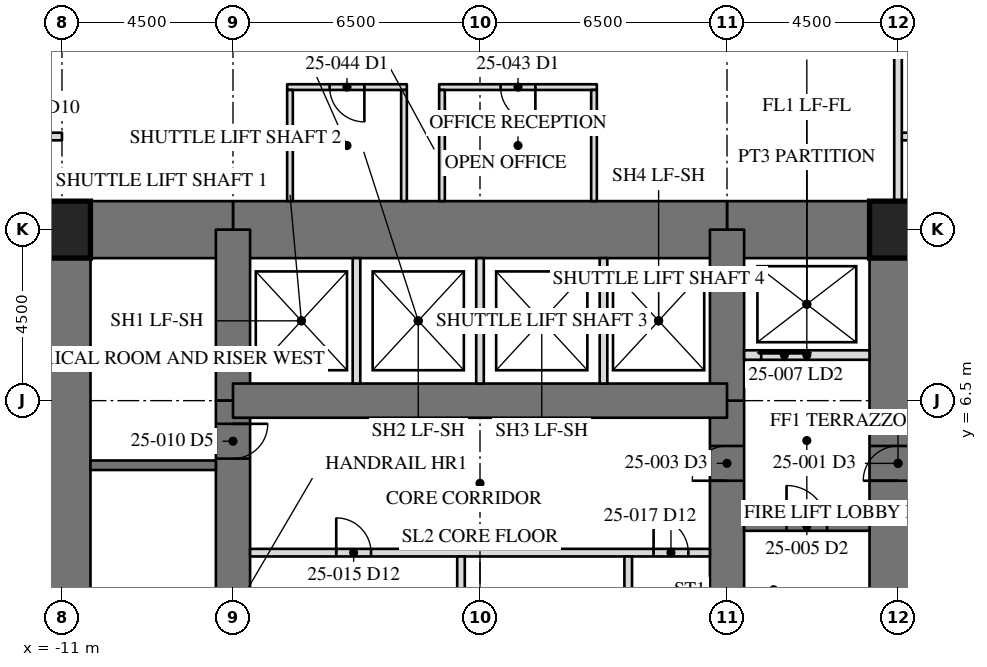
"""IFC4 building model, lengths in metres.
Left out: names, types, materials, properties, quantities, classifications, styles, units other than length and angle.
Written with IfcOpenShell. Run it as: python <this file> out.ifc"""

import sys

from ifc_helpers import new_model, si_unit, direction, frame, frame_2d, origin, origin_2d, place, context, subcontext, project, spatial, rectangle, hollow_rectangle, extrude, element, fill, save


model = new_model("IFC4")
c1 = context("Model", 3, precision=1e-05, world=origin(), true_north=direction((0.0, 1.0)))
c2 = subcontext(c1, "Body", "Model", "MODEL_VIEW")
j1 = project(units=[si_unit("LENGTHUNIT", "METRE"), si_unit("PLANEANGLEUNIT", "RADIAN")], contexts=[c1])
p1 = place(None, origin())
s1 = spatial("IfcSite", under=j1, at=p1, CompositionType="ELEMENT")
p2 = place(p1, origin())
s2 = spatial("IfcBuilding", under=s1, at=p2, CompositionType="ELEMENT")
p3 = place(p2, frame((0.0, 0.0, 109.0)))
s3 = spatial("IfcBuildingStorey", under=s2, at=p3, CompositionType="ELEMENT", Elevation=109.0)
p4 = place(p3, frame((11.0, -11.0, 0.0), z_axis=(0.0, 0.0, 1.0), x_axis=(0.0, 1.0, 0.0)))
e1 = element("IfcWall", 1, at=p4, inside=s3, PredefinedType="SHEAR", context=c2, shape_type="SweptSolid", body=[
    extrude(rectangle(XDim=22.0, YDim=1.5, at=frame_2d((11.0, 0.0))), origin(), (0.0, 0.0, 1.0), 4.1),
])
p5 = place(p4, frame((15.393, 0.0, 0.0)))
e2 = element("IfcOpeningElement", 2, at=p5, cuts=e1, PredefinedType="OPENING", context=c2, shape_type="SweptSolid", body=[
    extrude(rectangle(XDim=0.915, YDim=2.134, at=frame_2d((0.458, 1.067))), frame((0.0, 0.76, 0.0), z_axis=(0.0, -1.0, 0.0), x_axis=(1.0, 0.0, 0.0)), (0.0, 0.0, 1.0), 1.52),
])
p6 = place(p3, frame((-11.0, 11.0, 0.0), z_axis=(0.0, 0.0, 1.0), x_axis=(0.0, -1.0, 0.0)))
e3 = element("IfcWall", 3, at=p6, inside=s3, PredefinedType="SHEAR", context=c2, shape_type="SweptSolid", body=[
    extrude(rectangle(XDim=22.0, YDim=1.5, at=frame_2d((11.0, 0.0))), origin(), (0.0, 0.0, 1.0), 4.1),
])
p7 = place(p6, frame((15.393, 0.0, 0.0)))
e4 = element("IfcOpeningElement", 4, at=p7, cuts=e3, PredefinedType="OPENING", context=c2, shape_type="SweptSolid", body=[
    extrude(rectangle(XDim=0.915, YDim=2.134, at=frame_2d((0.458, 1.067))), frame((0.0, 0.76, 0.0), z_axis=(0.0, -1.0, 0.0), x_axis=(1.0, 0.0, 0.0)), (0.0, 0.0, 1.0), 1.52),
])
p8 = place(p3, frame((11.0, 11.0, 0.0), z_axis=(0.0, 0.0, 1.0), x_axis=(-1.0, 0.0, 0.0)))
e5 = element("IfcWall", 5, at=p8, inside=s3, PredefinedType="SHEAR", context=c2, shape_type="SweptSolid", body=[
    extrude(rectangle(XDim=4.5, YDim=1.5, at=frame_2d((2.25, 0.0))), origin(), (0.0, 0.0, 1.0), 4.1),
])
p9 = place(p3, frame((6.5, 11.0, 0.0), z_axis=(0.0, 0.0, 1.0), x_axis=(-1.0, 0.0, 0.0)))
e6 = element("IfcWall", 6, at=p9, inside=s3, PredefinedType="SHEAR", context=c2, shape_type="SweptSolid", body=[
    extrude(rectangle(XDim=13.0, YDim=1.5, at=frame_2d((6.5, 0.0))), origin(), (0.0, 0.0, 1.0), 4.1),
])
p10 = place(p3, frame((-6.5, 11.0, 0.0), z_axis=(0.0, 0.0, 1.0), x_axis=(-1.0, 0.0, 0.0)))
e7 = element("IfcWall", 7, at=p10, inside=s3, PredefinedType="SHEAR", context=c2, shape_type="SweptSolid", body=[
    extrude(rectangle(XDim=4.5, YDim=1.5, at=frame_2d((2.25, 0.0))), origin(), (0.0, 0.0, 1.0), 4.1),
])
p11 = place(p3, frame((6.5, -6.5, 0.0), z_axis=(0.0, 0.0, 1.0), x_axis=(0.0, 1.0, 0.0)))
e8 = element("IfcWall", 8, at=p11, inside=s3, PredefinedType="SHEAR", context=c2, shape_type="SweptSolid", body=[
    extrude(rectangle(XDim=13.0, YDim=0.9, at=frame_2d((6.5, 0.0))), origin(), (0.0, 0.0, 1.0), 4.1),
])
p12 = place(p11, frame((10.893, 0.0, 0.0)))
e9 = element("IfcOpeningElement", 9, at=p12, cuts=e8, PredefinedType="OPENING", context=c2, shape_type="SweptSolid", body=[
    extrude(rectangle(XDim=0.915, YDim=2.134, at=frame_2d((0.458, 1.067))), frame((0.0, 0.46, 0.0), z_axis=(0.0, -1.0, 0.0), x_axis=(1.0, 0.0, 0.0)), (0.0, 0.0, 1.0), 0.92),
])
p13 = place(p11, frame((0.61, 0.0, 0.0)))
e10 = element("IfcOpeningElement", 10, at=p13, cuts=e8, PredefinedType="OPENING", context=c2, shape_type="SweptSolid", body=[
    extrude(rectangle(XDim=0.915, YDim=2.134, at=frame_2d((0.458, 1.067))), frame((0.0, 0.46, 0.0), z_axis=(0.0, -1.0, 0.0), x_axis=(1.0, 0.0, 0.0)), (0.0, 0.0, 1.0), 0.92),
])
for number, where, z_axis, x_axis in (
    (11, (6.5, 6.5, 0.0), (0.0, 0.0, 1.0), (0.0, 1.0, 0.0)),
    (12, (-6.5, 11.0, 0.0), (0.0, 0.0, 1.0), (0.0, -1.0, 0.0)),
):
    element("IfcWall", number, at=place(p3, frame(where, z_axis=z_axis, x_axis=x_axis)), inside=s3, PredefinedType="SHEAR", context=c2, shape_type="SweptSolid", body=[
        extrude(rectangle(XDim=4.5, YDim=0.9, at=frame_2d((2.25, 0.0))), origin(), (0.0, 0.0, 1.0), 4.1),
    ])
p14 = place(p3, frame((-6.5, 6.5, 0.0), z_axis=(0.0, 0.0, 1.0), x_axis=(0.0, -1.0, 0.0)))
e13 = element("IfcWall", 13, at=p14, inside=s3, PredefinedType="SHEAR", context=c2, shape_type="SweptSolid", body=[
    extrude(rectangle(XDim=13.0, YDim=0.9, at=frame_2d((6.5, 0.0))), origin(), (0.0, 0.0, 1.0), 4.1),
])
p15 = place(p14, frame((10.893, 0.0, 0.0)))
e14 = element("IfcOpeningElement", 14, at=p15, cuts=e13, PredefinedType="OPENING", context=c2, shape_type="SweptSolid", body=[
    extrude(rectangle(XDim=0.915, YDim=2.134, at=frame_2d((0.458, 1.067))), frame((0.0, 0.46, 0.0), z_axis=(0.0, -1.0, 0.0), x_axis=(1.0, 0.0, 0.0)), (0.0, 0.0, 1.0), 0.92),
])
p16 = place(p14, frame((0.61, 0.0, 0.0)))
e15 = element("IfcOpeningElement", 15, at=p16, cuts=e13, PredefinedType="OPENING", context=c2, shape_type="SweptSolid", body=[
    extrude(rectangle(XDim=0.915, YDim=2.134, at=frame_2d((0.458, 1.067))), frame((0.0, 0.46, 0.0), z_axis=(0.0, -1.0, 0.0), x_axis=(1.0, 0.0, 0.0)), (0.0, 0.0, 1.0), 0.92),
])
p17 = place(p3, frame((6.5, 6.5, 0.0), z_axis=(0.0, 0.0, 1.0), x_axis=(-1.0, 0.0, 0.0)))
e16 = element("IfcWall", 16, at=p17, inside=s3, PredefinedType="SHEAR", context=c2, shape_type="SweptSolid", body=[
    extrude(rectangle(XDim=13.0, YDim=0.9, at=frame_2d((6.5, 0.0))), origin(), (0.0, 0.0, 1.0), 4.1),
])
for number, where, z_axis, x_axis in (
    (17, (11.0, 11.0, 0.0), (0.0, 0.0, 1.0), (1.0, 0.0, 0.0)),
    (18, (-11.0, 11.0, 0.0), (0.0, 0.0, 1.0), (1.0, 0.0, 0.0)),
):
    element("IfcColumn", number, at=place(p3, frame(where, z_axis=z_axis, x_axis=x_axis)), inside=s3, PredefinedType="COLUMN", context=c2, shape_type="SweptSolid", body=[
        extrude(hollow_rectangle(XDim=1.499, YDim=1.499, WallThickness=0.102, at=origin_2d()), origin(), (0.0, 0.0, 1.0), 4.1),
    ])
p18 = place(p3, frame((-6.95, 4.8, 0.0), z_axis=(0.0, 0.0, 1.0), x_axis=(-1.0, 0.0, 0.0)))
e19 = element("IfcWall", 19, at=p18, inside=s3, PredefinedType="SOLIDWALL", context=c2, shape_type="SweptSolid", body=[
    extrude(rectangle(XDim=3.3, YDim=0.25, at=frame_2d((1.65, 0.0))), origin(), (0.0, 0.0, 1.0), 3.91),
])
p19 = place(p3, frame((6.95, 3.2, 0.0), z_axis=(0.0, 0.0, 1.0), x_axis=(1.0, 0.0, 0.0)))
e20 = element("IfcWall", 20, at=p19, inside=s3, PredefinedType="SOLIDWALL", context=c2, shape_type="SweptSolid", body=[
    extrude(rectangle(XDim=3.3, YDim=0.25, at=frame_2d((1.65, 0.0))), origin(), (0.0, 0.0, 1.0), 3.91),
])
p20 = place(p19, frame((1.116, 0.0, 0.0)))
e21 = element("IfcOpeningElement", 21, at=p20, cuts=e20, PredefinedType="OPENING", context=c2, shape_type="SweptSolid", body=[
    extrude(rectangle(XDim=1.067, YDim=2.134, at=frame_2d((0.533, 1.067))), frame((0.0, 0.135, 0.0), z_axis=(0.0, -1.0, 0.0), x_axis=(1.0, 0.0, 0.0)), (0.0, 0.0, 1.0), 0.27),
])
p21 = place(p3, frame((6.95, 7.7, 0.0), z_axis=(0.0, 0.0, 1.0), x_axis=(1.0, 0.0, 0.0)))
e22 = element("IfcWall", 22, at=p21, inside=s3, PredefinedType="PARTITIONING", context=c2, shape_type="SweptSolid", body=[
    extrude(rectangle(XDim=3.3, YDim=0.25, at=frame_2d((1.65, 0.0))), origin(), (0.0, 0.0, 1.0), 3.91),
])
p22 = place(p21, frame((0.45, 0.0, 0.0)))
e23 = element("IfcOpeningElement", 23, at=p22, cuts=e22, PredefinedType="OPENING", context=c2, shape_type="SweptSolid", body=[
    extrude(rectangle(XDim=1.219, YDim=2.134, at=frame_2d((0.609, 1.067))), frame((0.0, 0.135, 0.0), z_axis=(0.0, -1.0, 0.0), x_axis=(1.0, 0.0, 0.0)), (0.0, 0.0, 1.0), 0.27),
])
p23 = place(p3, frame((-6.05, 2.5, 0.0), z_axis=(0.0, 0.0, 1.0), x_axis=(1.0, 0.0, 0.0)))
e24 = element("IfcWall", 24, at=p23, inside=s3, PredefinedType="PARTITIONING", context=c2, shape_type="SweptSolid", body=[
    extrude(rectangle(XDim=12.1, YDim=0.2, at=frame_2d((6.05, 0.0))), origin(), (0.0, 0.0, 1.0), 3.91),
])
p24 = place(p23, frame((2.268, 0.0, 0.0)))
e25 = element("IfcOpeningElement", 25, at=p24, cuts=e24, PredefinedType="OPENING", context=c2, shape_type="SweptSolid", body=[
    extrude(rectangle(XDim=0.915, YDim=2.134, at=frame_2d((0.458, 1.067))), frame((0.0, 0.11, 0.0), z_axis=(0.0, -1.0, 0.0), x_axis=(1.0, 0.0, 0.0)), (0.0, 0.0, 1.0), 0.22),
])
p25 = place(p23, frame((10.617, 0.0, 0.0)))
e26 = element("IfcOpeningElement", 26, at=p25, cuts=e24, PredefinedType="OPENING", context=c2, shape_type="SweptSolid", body=[
    extrude(rectangle(XDim=0.915, YDim=2.134, at=frame_2d((0.458, 1.067))), frame((0.0, 0.11, 0.0), z_axis=(0.0, -1.0, 0.0), x_axis=(1.0, 0.0, 0.0)), (0.0, 0.0, 1.0), 0.22),
])
for number, where, z_axis, x_axis in (
    (27, (-3.25, 6.95, 0.0), (0.0, 0.0, 1.0), (0.0, 1.0, 0.0)),
    (28, (0.0, 6.95, 0.0), (0.0, 0.0, 1.0), (0.0, 1.0, 0.0)),
    (29, (3.25, 6.95, 0.0), (0.0, 0.0, 1.0), (0.0, 1.0, 0.0)),
):
    element("IfcWall", number, at=place(p3, frame(where, z_axis=z_axis, x_axis=x_axis)), inside=s3, PredefinedType="PARTITIONING", context=c2, shape_type="SweptSolid", body=[
        extrude(rectangle(XDim=3.3, YDim=0.2, at=frame_2d((1.65, 0.0))), origin(), (0.0, 0.0, 1.0), 3.91),
    ])
for number, where, z_axis, x_axis in (
    (30, (-0.5, -2.4, 0.0), (0.0, 0.0, 1.0), (0.0, 1.0, 0.0)),
    (31, (3.9, -2.4, 0.0), (0.0, 0.0, 1.0), (0.0, 1.0, 0.0)),
):
    element("IfcWall", number, at=place(p3, frame(where, z_axis=z_axis, x_axis=x_axis)), inside=s3, PredefinedType="PARTITIONING", context=c2, shape_type="SweptSolid", body=[
        extrude(rectangle(XDim=4.8, YDim=0.2, at=frame_2d((2.4, 0.0))), origin(), (0.0, 0.0, 1.0), 3.91),
    ])
for number, where, z_axis, x_axis in (
    (32, (11.0, 13.45, 0.0), (0.0, 0.0, 1.0), (1.0, 0.0, 0.0)),
    (33, (-11.0, 13.45, 0.0), (0.0, 0.0, 1.0), (-1.0, 0.0, 0.0)),
):
    element("IfcWall", number, at=place(p3, frame(where, z_axis=z_axis, x_axis=x_axis)), inside=s3, PredefinedType="PARTITIONING", context=c2, shape_type="SweptSolid", body=[
        extrude(rectangle(XDim=2.55, YDim=0.2, at=frame_2d((1.275, 0.0))), origin(), (0.0, 0.0, 1.0), 3.91),
    ])
p26 = place(p3, frame((11.0, 11.75, 0.0), z_axis=(0.0, 0.0, 1.0), x_axis=(0.0, 1.0, 0.0)))
e34 = element("IfcWall", 34, at=p26, inside=s3, PredefinedType="PARTITIONING", context=c2, shape_type="SweptSolid", body=[
    extrude(rectangle(XDim=10.665, YDim=0.2, at=frame_2d((5.333, 0.0))), origin(), (0.0, 0.0, 1.0), 3.326),
])
p27 = place(p3, frame((3.075, 14.75, 0.0), z_axis=(0.0, 0.0, 1.0), x_axis=(-1.0, 0.0, 0.0)))
e35 = element("IfcWall", 35, at=p27, inside=s3, PredefinedType="PARTITIONING", context=c2, shape_type="SweptSolid", body=[
    extrude(rectangle(XDim=4.15, YDim=0.15, at=frame_2d((2.075, 0.0))), origin(), (0.0, 0.0, 1.0), 3.91),
])
p28 = place(p27, frame((1.617, 0.0, 0.0)))
e36 = element("IfcOpeningElement", 36, at=p28, cuts=e35, PredefinedType="OPENING", context=c2, shape_type="SweptSolid", body=[
    extrude(rectangle(XDim=0.915, YDim=2.134, at=frame_2d((0.458, 1.067))), frame((0.0, 0.085, 0.0), z_axis=(0.0, -1.0, 0.0), x_axis=(1.0, 0.0, 0.0)), (0.0, 0.0, 1.0), 0.17),
])
for number, where, z_axis, x_axis in (
    (37, (3.0, 14.675, 0.0), (0.0, 0.0, 1.0), (0.0, -1.0, 0.0)),
    (38, (-1.0, 14.675, 0.0), (0.0, 0.0, 1.0), (0.0, -1.0, 0.0)),
):
    element("IfcWall", number, at=place(p3, frame(where, z_axis=z_axis, x_axis=x_axis)), inside=s3, PredefinedType="PARTITIONING", context=c2, shape_type="SweptSolid", body=[
        extrude(rectangle(XDim=2.925, YDim=0.15, at=frame_2d((1.462, 0.0))), origin(), (0.0, 0.0, 1.0), 3.91),
    ])
p29 = place(p3, frame((-1.925, 14.75, 0.0), z_axis=(0.0, 0.0, 1.0), x_axis=(-1.0, 0.0, 0.0)))
e39 = element("IfcWall", 39, at=p29, inside=s3, PredefinedType="PARTITIONING", context=c2, shape_type="SweptSolid", body=[
    extrude(rectangle(XDim=3.15, YDim=0.15, at=frame_2d((1.575, 0.0))), origin(), (0.0, 0.0, 1.0), 3.91),
])
p30 = place(p29, frame((1.117, 0.0, 0.0)))
e40 = element("IfcOpeningElement", 40, at=p30, cuts=e39, PredefinedType="OPENING", context=c2, shape_type="SweptSolid", body=[
    extrude(rectangle(XDim=0.915, YDim=2.134, at=frame_2d((0.458, 1.067))), frame((0.0, 0.085, 0.0), z_axis=(0.0, -1.0, 0.0), x_axis=(1.0, 0.0, 0.0)), (0.0, 0.0, 1.0), 0.17),
])
for number, where, z_axis, x_axis in (
    (41, (-2.0, 14.675, 0.0), (0.0, 0.0, 1.0), (0.0, -1.0, 0.0)),
    (42, (-5.0, 14.675, 0.0), (0.0, 0.0, 1.0), (0.0, -1.0, 0.0)),
):
    element("IfcWall", number, at=place(p3, frame(where, z_axis=z_axis, x_axis=x_axis)), inside=s3, PredefinedType="PARTITIONING", context=c2, shape_type="SweptSolid", body=[
        extrude(rectangle(XDim=2.925, YDim=0.15, at=frame_2d((1.462, 0.0))), origin(), (0.0, 0.0, 1.0), 3.91),
    ])
p31 = place(p12, origin())
e43 = element("IfcDoor", 43, at=p31, inside=s3, OperationType="SINGLE_SWING_RIGHT", PredefinedType="DOOR", context=c2, shape_type="SweptSolid", body=[
    extrude(rectangle(XDim=0.915, YDim=2.134, at=frame_2d((0.458, 1.067))), frame((0.0, -0.375, 0.0), z_axis=(0.0, -1.0, 0.0), x_axis=(1.0, 0.0, 0.0)), (0.0, 0.0, 1.0), 0.05),
])
fill(e9, e43)
p32 = place(p20, origin())
e44 = element("IfcDoor", 44, at=p32, inside=s3, OperationType="SINGLE_SWING_LEFT", PredefinedType="DOOR", context=c2, shape_type="SweptSolid", body=[
    extrude(rectangle(XDim=1.067, YDim=2.134, at=frame_2d((0.533, 1.067))), frame((0.0, 0.025, 0.0), z_axis=(0.0, -1.0, 0.0), x_axis=(1.0, 0.0, 0.0)), (0.0, 0.0, 1.0), 0.05),
])
fill(e21, e44)
p33 = place(p22, origin())
e45 = element("IfcDoor", 45, at=p33, inside=s3, OperationType="SLIDING_TO_LEFT", PredefinedType="DOOR", context=c2, shape_type="SweptSolid", body=[
    extrude(rectangle(XDim=1.219, YDim=2.134, at=frame_2d((0.609, 1.067))), frame((0.0, 0.025, 0.0), z_axis=(0.0, -1.0, 0.0), x_axis=(1.0, 0.0, 0.0)), (0.0, 0.0, 1.0), 0.05),
])
fill(e23, e45)
p34 = place(p16, origin())
e46 = element("IfcDoor", 46, at=p34, inside=s3, OperationType="SINGLE_SWING_RIGHT", PredefinedType="DOOR", context=c2, shape_type="SweptSolid", body=[
    extrude(rectangle(XDim=0.915, YDim=2.134, at=frame_2d((0.458, 1.067))), frame((0.0, -0.375, 0.0), z_axis=(0.0, -1.0, 0.0), x_axis=(1.0, 0.0, 0.0)), (0.0, 0.0, 1.0), 0.05),
])
fill(e15, e46)
p35 = place(p24, origin())
e47 = element("IfcDoor", 47, at=p35, inside=s3, OperationType="SINGLE_SWING_LEFT", PredefinedType="DOOR", context=c2, shape_type="SweptSolid", body=[
    extrude(rectangle(XDim=0.915, YDim=2.134, at=frame_2d((0.458, 1.067))), frame((0.0, 0.025, 0.0), z_axis=(0.0, -1.0, 0.0), x_axis=(1.0, 0.0, 0.0)), (0.0, 0.0, 1.0), 0.05),
])
fill(e25, e47)
p36 = place(p25, origin())
e48 = element("IfcDoor", 48, at=p36, inside=s3, OperationType="SINGLE_SWING_LEFT", PredefinedType="DOOR", context=c2, shape_type="SweptSolid", body=[
    extrude(rectangle(XDim=0.915, YDim=2.134, at=frame_2d((0.458, 1.067))), frame((0.0, 0.025, 0.0), z_axis=(0.0, -1.0, 0.0), x_axis=(1.0, 0.0, 0.0)), (0.0, 0.0, 1.0), 0.05),
])
fill(e26, e48)
p37 = place(p28, origin())
e49 = element("IfcDoor", 49, at=p37, inside=s3, OperationType="SINGLE_SWING_LEFT", PredefinedType="DOOR", context=c2, shape_type="SweptSolid", body=[
    extrude(rectangle(XDim=0.915, YDim=2.134, at=frame_2d((0.458, 1.067))), frame((0.0, 0.025, 0.0), z_axis=(0.0, -1.0, 0.0), x_axis=(1.0, 0.0, 0.0)), (0.0, 0.0, 1.0), 0.05),
])
fill(e36, e49)
p38 = place(p30, origin())
e50 = element("IfcDoor", 50, at=p38, inside=s3, OperationType="SINGLE_SWING_LEFT", PredefinedType="DOOR", context=c2, shape_type="SweptSolid", body=[
    extrude(rectangle(XDim=0.915, YDim=2.134, at=frame_2d((0.458, 1.067))), frame((0.0, 0.025, 0.0), z_axis=(0.0, -1.0, 0.0), x_axis=(1.0, 0.0, 0.0)), (0.0, 0.0, 1.0), 0.05),
])
fill(e40, e50)
save(model, sys.argv[1])
